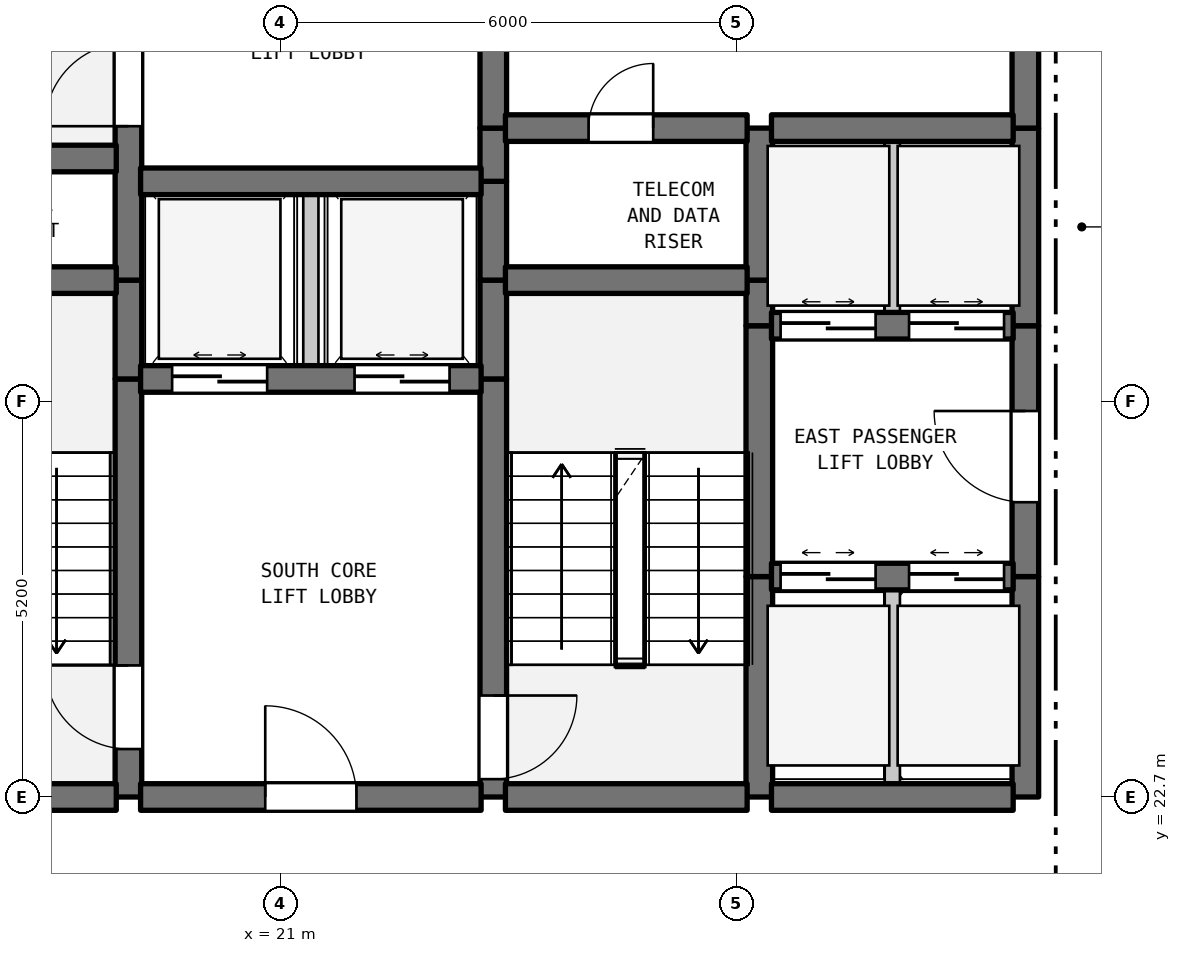
"""IFC4 building model, lengths in metres.
Left out: names, types, materials, properties, quantities, classifications, styles, units other than length and angle.
Written with IfcOpenShell. Run it as: python <this file> out.ifc"""

import sys

from ifc_helpers import new_model, si_unit, direction, frame, frame_2d, origin, place, context, subcontext, project, spatial, rectangle, extrude, element, fill, save


model = new_model("IFC4")
c1 = context("Model", 3, precision=1e-05, world=origin(), true_north=direction((0.0, 1.0)))
c2 = subcontext(c1, "Body", "Model", "MODEL_VIEW")
j1 = project(units=[si_unit("LENGTHUNIT", "METRE"), si_unit("PLANEANGLEUNIT", "RADIAN")], contexts=[c1])
p1 = place(None, origin())
s1 = spatial("IfcSite", under=j1, at=p1, CompositionType="ELEMENT")
p2 = place(p1, origin())
s2 = spatial("IfcBuilding", under=s1, at=p2, CompositionType="ELEMENT")
p3 = place(p2, frame((0.0, 0.0, 13.0)))
s3 = spatial("IfcBuildingStorey", under=s2, at=p3, CompositionType="ELEMENT", Elevation=13.0)
p4 = place(p3, frame((19.0, 22.7, 0.0), z_axis=(0.0, 0.0, 1.0), x_axis=(0.0, 1.0, 0.0)))
e1 = element("IfcWall", 1, at=p4, inside=s3, PredefinedType="SHEAR", context=c2, shape_type="SweptSolid", body=[
    extrude(rectangle(XDim=5.5, YDim=0.35, at=frame_2d((2.75, 0.0))), origin(), (0.0, 0.0, 1.0), 5.58),
])
p5 = place(p4, frame((0.631, 0.0, 0.0)))
e2 = element("IfcOpeningElement", 2, at=p5, cuts=e1, PredefinedType="OPENING", context=c2, shape_type="SweptSolid", body=[
    extrude(rectangle(XDim=1.1, YDim=2.15, at=frame_2d((0.55, 1.075))), frame((0.0, 0.185, 0.0), z_axis=(0.0, -1.0, 0.0), x_axis=(1.0, 0.0, 0.0)), (0.0, 0.0, 1.0), 0.37),
])
p6 = place(p3, frame((19.0, 28.2, 0.0), z_axis=(0.0, 0.0, 1.0), x_axis=(0.0, 1.0, 0.0)))
e3 = element("IfcWall", 3, at=p6, inside=s3, PredefinedType="SHEAR", context=c2, shape_type="SweptSolid", body=[
    extrude(rectangle(XDim=1.3, YDim=0.35, at=frame_2d((0.65, 0.0))), origin(), (0.0, 0.0, 1.0), 5.58),
])
p7 = place(p3, frame((19.0, 29.5, 0.0), z_axis=(0.0, 0.0, 1.0), x_axis=(0.0, 1.0, 0.0)))
e4 = element("IfcWall", 4, at=p7, inside=s3, PredefinedType="SHEAR", context=c2, shape_type="SweptSolid", body=[
    extrude(rectangle(XDim=5.5, YDim=0.35, at=frame_2d((2.75, 0.0))), origin(), (0.0, 0.0, 1.0), 5.58),
])
p8 = place(p7, frame((2.025, 0.0, 0.0)))
e5 = element("IfcOpeningElement", 5, at=p8, cuts=e4, PredefinedType="OPENING", context=c2, shape_type="SweptSolid", body=[
    extrude(rectangle(XDim=1.1, YDim=2.15, at=frame_2d((0.55, 1.075))), frame((0.0, 0.185, 0.0), z_axis=(0.0, -1.0, 0.0), x_axis=(1.0, 0.0, 0.0)), (0.0, 0.0, 1.0), 0.37),
])
p9 = place(p3, frame((21.4, 28.2, 0.0), z_axis=(0.0, 0.0, 1.0), x_axis=(0.0, 1.0, 0.0)))
e6 = element("IfcWall", 6, at=p9, inside=s3, PredefinedType="STANDARD", context=c2, shape_type="SweptSolid", body=[
    extrude(rectangle(XDim=2.6, YDim=0.2, at=frame_2d((1.3, 0.0))), origin(), (0.0, 0.0, 1.0), 5.58),
])
p10 = place(p3, frame((23.8, 22.7, 0.0), z_axis=(0.0, 0.0, 1.0), x_axis=(0.0, 1.0, 0.0)))
e7 = element("IfcWall", 7, at=p10, inside=s3, PredefinedType="SHEAR", context=c2, shape_type="SweptSolid", body=[
    extrude(rectangle(XDim=5.5, YDim=0.35, at=frame_2d((2.75, 0.0))), origin(), (0.0, 0.0, 1.0), 5.58),
])
p11 = place(p10, frame((0.235, 0.0, 0.0)))
e8 = element("IfcOpeningElement", 8, at=p11, cuts=e7, PredefinedType="OPENING", context=c2, shape_type="SweptSolid", body=[
    extrude(rectangle(XDim=1.1, YDim=2.15, at=frame_2d((0.55, 1.075))), frame((0.0, 0.185, 0.0), z_axis=(0.0, -1.0, 0.0), x_axis=(1.0, 0.0, 0.0)), (0.0, 0.0, 1.0), 0.37),
])
for number, where, z_axis, x_axis in (
    (9, (23.8, 28.2, 0.0), (0.0, 0.0, 1.0), (0.0, 1.0, 0.0)),
    (10, (23.8, 29.5, 0.0), (0.0, 0.0, 1.0), (0.0, 1.0, 0.0)),
):
    element("IfcWall", number, at=place(p3, frame(where, z_axis=z_axis, x_axis=x_axis)), inside=s3, PredefinedType="SHEAR", context=c2, shape_type="SweptSolid", body=[
        extrude(rectangle(XDim=1.3, YDim=0.35, at=frame_2d((0.65, 0.0))), origin(), (0.0, 0.0, 1.0), 5.58),
    ])
p12 = place(p3, frame((23.8, 30.8, 0.0), z_axis=(0.0, 0.0, 1.0), x_axis=(0.0, 1.0, 0.0)))
e11 = element("IfcWall", 11, at=p12, inside=s3, PredefinedType="SHEAR", context=c2, shape_type="SweptSolid", body=[
    extrude(rectangle(XDim=0.7, YDim=0.35, at=frame_2d((0.35, 0.0))), origin(), (0.0, 0.0, 1.0), 5.58),
])
p13 = place(p3, frame((23.8, 31.5, 0.0), z_axis=(0.0, 0.0, 1.0), x_axis=(0.0, 1.0, 0.0)))
e12 = element("IfcWall", 12, at=p13, inside=s3, PredefinedType="SHEAR", context=c2, shape_type="SweptSolid", body=[
    extrude(rectangle(XDim=3.5, YDim=0.35, at=frame_2d((1.75, 0.0))), origin(), (0.0, 0.0, 1.0), 5.58),
])
p14 = place(p13, frame((1.127, 0.0, 0.0)))
e13 = element("IfcOpeningElement", 13, at=p14, cuts=e12, PredefinedType="OPENING", context=c2, shape_type="SweptSolid", body=[
    extrude(rectangle(XDim=1.1, YDim=2.15, at=frame_2d((0.55, 1.075))), frame((0.0, 0.185, 0.0), z_axis=(0.0, -1.0, 0.0), x_axis=(1.0, 0.0, 0.0)), (0.0, 0.0, 1.0), 0.37),
])
p15 = place(p3, frame((27.3, 22.7, 0.0), z_axis=(0.0, 0.0, 1.0), x_axis=(0.0, 1.0, 0.0)))
e14 = element("IfcWall", 14, at=p15, inside=s3, PredefinedType="SHEAR", context=c2, shape_type="SweptSolid", body=[
    extrude(rectangle(XDim=2.9, YDim=0.35, at=frame_2d((1.45, 0.0))), origin(), (0.0, 0.0, 1.0), 5.58),
])
p16 = place(p3, frame((27.3, 25.6, 0.0), z_axis=(0.0, 0.0, 1.0), x_axis=(0.0, 1.0, 0.0)))
e15 = element("IfcWall", 15, at=p16, inside=s3, PredefinedType="SHEAR", context=c2, shape_type="SweptSolid", body=[
    extrude(rectangle(XDim=3.3, YDim=0.35, at=frame_2d((1.65, 0.0))), origin(), (0.0, 0.0, 1.0), 5.58),
])
p17 = place(p3, frame((27.3, 28.9, 0.0), z_axis=(0.0, 0.0, 1.0), x_axis=(0.0, 1.0, 0.0)))
e16 = element("IfcWall", 16, at=p17, inside=s3, PredefinedType="SHEAR", context=c2, shape_type="SweptSolid", body=[
    extrude(rectangle(XDim=0.6, YDim=0.35, at=frame_2d((0.3, 0.0))), origin(), (0.0, 0.0, 1.0), 5.58),
])
p18 = place(p3, frame((27.3, 29.5, 0.0), z_axis=(0.0, 0.0, 1.0), x_axis=(0.0, 1.0, 0.0)))
e17 = element("IfcWall", 17, at=p18, inside=s3, PredefinedType="SHEAR", context=c2, shape_type="SweptSolid", body=[
    extrude(rectangle(XDim=2.0, YDim=0.35, at=frame_2d((1.0, 0.0))), origin(), (0.0, 0.0, 1.0), 5.58),
])
p19 = place(p3, frame((29.05, 22.7, 0.0), z_axis=(0.0, 0.0, 1.0), x_axis=(0.0, 1.0, 0.0)))
e18 = element("IfcWall", 18, at=p19, inside=s3, PredefinedType="STANDARD", context=c2, shape_type="SweptSolid", body=[
    extrude(rectangle(XDim=2.9, YDim=0.2, at=frame_2d((1.45, 0.0))), origin(), (0.0, 0.0, 1.0), 5.58),
])
p20 = place(p3, frame((29.05, 28.9, 0.0), z_axis=(0.0, 0.0, 1.0), x_axis=(0.0, 1.0, 0.0)))
e19 = element("IfcWall", 19, at=p20, inside=s3, PredefinedType="STANDARD", context=c2, shape_type="SweptSolid", body=[
    extrude(rectangle(XDim=2.6, YDim=0.2, at=frame_2d((1.3, 0.0))), origin(), (0.0, 0.0, 1.0), 5.58),
])
p21 = place(p3, frame((30.8, 22.7, 0.0), z_axis=(0.0, 0.0, 1.0), x_axis=(0.0, 1.0, 0.0)))
e20 = element("IfcWall", 20, at=p21, inside=s3, PredefinedType="SHEAR", context=c2, shape_type="SweptSolid", body=[
    extrude(rectangle(XDim=2.9, YDim=0.35, at=frame_2d((1.45, 0.0))), origin(), (0.0, 0.0, 1.0), 5.58),
])
p22 = place(p3, frame((30.8, 25.6, 0.0), z_axis=(0.0, 0.0, 1.0), x_axis=(0.0, 1.0, 0.0)))
e21 = element("IfcWall", 21, at=p22, inside=s3, PredefinedType="SHEAR", context=c2, shape_type="SweptSolid", body=[
    extrude(rectangle(XDim=3.3, YDim=0.35, at=frame_2d((1.65, 0.0))), origin(), (0.0, 0.0, 1.0), 5.58),
])
p23 = place(p22, frame((0.978, 0.0, 0.0)))
e22 = element("IfcOpeningElement", 22, at=p23, cuts=e21, PredefinedType="OPENING", context=c2, shape_type="SweptSolid", body=[
    extrude(rectangle(XDim=1.2, YDim=2.2, at=frame_2d((0.6, 1.1))), frame((0.0, 0.185, 0.0), z_axis=(0.0, -1.0, 0.0), x_axis=(1.0, 0.0, 0.0)), (0.0, 0.0, 1.0), 0.37),
])
p24 = place(p3, frame((30.8, 28.9, 0.0), z_axis=(0.0, 0.0, 1.0), x_axis=(0.0, 1.0, 0.0)))
e23 = element("IfcWall", 23, at=p24, inside=s3, PredefinedType="SHEAR", context=c2, shape_type="SweptSolid", body=[
    extrude(rectangle(XDim=2.6, YDim=0.35, at=frame_2d((1.3, 0.0))), origin(), (0.0, 0.0, 1.0), 5.58),
])
p25 = place(p3, frame((30.8, 31.5, 0.0), z_axis=(0.0, 0.0, 1.0), x_axis=(0.0, 1.0, 0.0)))
e24 = element("IfcWall", 24, at=p25, inside=s3, PredefinedType="SHEAR", context=c2, shape_type="SweptSolid", body=[
    extrude(rectangle(XDim=3.5, YDim=0.35, at=frame_2d((1.75, 0.0))), origin(), (0.0, 0.0, 1.0), 5.58),
])
p26 = place(p25, frame((1.15, 0.0, 0.0)))
e25 = element("IfcOpeningElement", 25, at=p26, cuts=e24, PredefinedType="OPENING", context=c2, shape_type="SweptSolid", body=[
    extrude(rectangle(XDim=1.2, YDim=2.2, at=frame_2d((0.6, 1.1))), frame((0.0, 0.185, 0.0), z_axis=(0.0, -1.0, 0.0), x_axis=(1.0, 0.0, 0.0)), (0.0, 0.0, 1.0), 0.37),
])
p27 = place(p3, frame((15.16, 22.7, 0.0), z_axis=(0.0, 0.0, 1.0), x_axis=(1.0, 0.0, 0.0)))
e26 = element("IfcWall", 26, at=p27, inside=s3, PredefinedType="SHEAR", context=c2, shape_type="SweptSolid", body=[
    extrude(rectangle(XDim=3.68, YDim=0.35, at=frame_2d((1.84, 0.0))), origin(), (0.0, 0.0, 1.0), 5.58),
])
p28 = place(p3, frame((19.16, 22.7, 0.0), z_axis=(0.0, 0.0, 1.0), x_axis=(1.0, 0.0, 0.0)))
e27 = element("IfcWall", 27, at=p28, inside=s3, PredefinedType="SHEAR", context=c2, shape_type="SweptSolid", body=[
    extrude(rectangle(XDim=4.48, YDim=0.35, at=frame_2d((2.24, 0.0))), origin(), (0.0, 0.0, 1.0), 5.58),
])
p29 = place(p28, frame((1.64, 0.0, 0.0)))
e28 = element("IfcOpeningElement", 28, at=p29, cuts=e27, PredefinedType="OPENING", context=c2, shape_type="SweptSolid", body=[
    extrude(rectangle(XDim=1.2, YDim=2.2, at=frame_2d((0.6, 1.1))), frame((0.0, 0.185, 0.0), z_axis=(0.0, -1.0, 0.0), x_axis=(1.0, 0.0, 0.0)), (0.0, 0.0, 1.0), 0.37),
])
for number, where, z_axis, x_axis in (
    (29, (23.96, 22.7, 0.0), (0.0, 0.0, 1.0), (1.0, 0.0, 0.0)),
    (30, (27.46, 22.7, 0.0), (0.0, 0.0, 1.0), (1.0, 0.0, 0.0)),
):
    element("IfcWall", number, at=place(p3, frame(where, z_axis=z_axis, x_axis=x_axis)), inside=s3, PredefinedType="SHEAR", context=c2, shape_type="SweptSolid", body=[
        extrude(rectangle(XDim=3.18, YDim=0.35, at=frame_2d((1.59, 0.0))), origin(), (0.0, 0.0, 1.0), 5.58),
    ])
p30 = place(p3, frame((27.46, 25.6, 0.0), z_axis=(0.0, 0.0, 1.0), x_axis=(1.0, 0.0, 0.0)))
e31 = element("IfcWall", 31, at=p30, inside=s3, PredefinedType="SHEAR", context=c2, shape_type="SweptSolid", body=[
    extrude(rectangle(XDim=3.18, YDim=0.35, at=frame_2d((1.59, 0.0))), origin(), (0.0, 0.0, 1.0), 5.58),
])
p31 = place(p30, frame((0.12, 0.0, 0.0)))
e32 = element("IfcOpeningElement", 32, at=p31, cuts=e31, PredefinedType="OPENING", context=c2, shape_type="SweptSolid", body=[
    extrude(rectangle(XDim=1.25, YDim=2.2, at=frame_2d((0.625, 1.1))), frame((0.0, 0.185, 0.0), z_axis=(0.0, -1.0, 0.0), x_axis=(1.0, 0.0, 0.0)), (0.0, 0.0, 1.0), 0.37),
])
p32 = place(p30, frame((1.81, 0.0, 0.0)))
e33 = element("IfcOpeningElement", 33, at=p32, cuts=e31, PredefinedType="OPENING", context=c2, shape_type="SweptSolid", body=[
    extrude(rectangle(XDim=1.25, YDim=2.2, at=frame_2d((0.625, 1.1))), frame((0.0, 0.185, 0.0), z_axis=(0.0, -1.0, 0.0), x_axis=(1.0, 0.0, 0.0)), (0.0, 0.0, 1.0), 0.37),
])
p33 = place(p3, frame((19.16, 28.2, 0.0), z_axis=(0.0, 0.0, 1.0), x_axis=(1.0, 0.0, 0.0)))
e34 = element("IfcWall", 34, at=p33, inside=s3, PredefinedType="SHEAR", context=c2, shape_type="SweptSolid", body=[
    extrude(rectangle(XDim=4.48, YDim=0.35, at=frame_2d((2.24, 0.0))), origin(), (0.0, 0.0, 1.0), 5.58),
])
p34 = place(p33, frame((0.415, 0.0, 0.0)))
e35 = element("IfcOpeningElement", 35, at=p34, cuts=e34, PredefinedType="OPENING", context=c2, shape_type="SweptSolid", body=[
    extrude(rectangle(XDim=1.25, YDim=2.2, at=frame_2d((0.625, 1.1))), frame((0.0, 0.185, 0.0), z_axis=(0.0, -1.0, 0.0), x_axis=(1.0, 0.0, 0.0)), (0.0, 0.0, 1.0), 0.37),
])
p35 = place(p33, frame((2.815, 0.0, 0.0)))
e36 = element("IfcOpeningElement", 36, at=p35, cuts=e34, PredefinedType="OPENING", context=c2, shape_type="SweptSolid", body=[
    extrude(rectangle(XDim=1.25, YDim=2.2, at=frame_2d((0.625, 1.1))), frame((0.0, 0.185, 0.0), z_axis=(0.0, -1.0, 0.0), x_axis=(1.0, 0.0, 0.0)), (0.0, 0.0, 1.0), 0.37),
])
p36 = place(p3, frame((27.46, 28.9, 0.0), z_axis=(0.0, 0.0, 1.0), x_axis=(1.0, 0.0, 0.0)))
e37 = element("IfcWall", 37, at=p36, inside=s3, PredefinedType="SHEAR", context=c2, shape_type="SweptSolid", body=[
    extrude(rectangle(XDim=3.18, YDim=0.35, at=frame_2d((1.59, 0.0))), origin(), (0.0, 0.0, 1.0), 5.58),
])
p37 = place(p36, frame((0.12, 0.0, 0.0)))
e38 = element("IfcOpeningElement", 38, at=p37, cuts=e37, PredefinedType="OPENING", context=c2, shape_type="SweptSolid", body=[
    extrude(rectangle(XDim=1.25, YDim=2.2, at=frame_2d((0.625, 1.1))), frame((0.0, 0.185, 0.0), z_axis=(0.0, -1.0, 0.0), x_axis=(1.0, 0.0, 0.0)), (0.0, 0.0, 1.0), 0.37),
])
p38 = place(p36, frame((1.81, 0.0, 0.0)))
e39 = element("IfcOpeningElement", 39, at=p38, cuts=e37, PredefinedType="OPENING", context=c2, shape_type="SweptSolid", body=[
    extrude(rectangle(XDim=1.25, YDim=2.2, at=frame_2d((0.625, 1.1))), frame((0.0, 0.185, 0.0), z_axis=(0.0, -1.0, 0.0), x_axis=(1.0, 0.0, 0.0)), (0.0, 0.0, 1.0), 0.37),
])
p39 = place(p3, frame((15.16, 29.5, 0.0), z_axis=(0.0, 0.0, 1.0), x_axis=(1.0, 0.0, 0.0)))
e40 = element("IfcWall", 40, at=p39, inside=s3, PredefinedType="SHEAR", context=c2, shape_type="SweptSolid", body=[
    extrude(rectangle(XDim=3.68, YDim=0.35, at=frame_2d((1.84, 0.0))), origin(), (0.0, 0.0, 1.0), 5.58),
])
p40 = place(p3, frame((23.96, 29.5, 0.0), z_axis=(0.0, 0.0, 1.0), x_axis=(1.0, 0.0, 0.0)))
e41 = element("IfcWall", 41, at=p40, inside=s3, PredefinedType="SHEAR", context=c2, shape_type="SweptSolid", body=[
    extrude(rectangle(XDim=3.18, YDim=0.35, at=frame_2d((1.59, 0.0))), origin(), (0.0, 0.0, 1.0), 5.58),
])
p41 = place(p3, frame((19.16, 30.8, 0.0), z_axis=(0.0, 0.0, 1.0), x_axis=(1.0, 0.0, 0.0)))
e42 = element("IfcWall", 42, at=p41, inside=s3, PredefinedType="SHEAR", context=c2, shape_type="SweptSolid", body=[
    extrude(rectangle(XDim=4.48, YDim=0.35, at=frame_2d((2.24, 0.0))), origin(), (0.0, 0.0, 1.0), 5.58),
])
p42 = place(p3, frame((15.16, 31.1, 0.0), z_axis=(0.0, 0.0, 1.0), x_axis=(1.0, 0.0, 0.0)))
e43 = element("IfcWall", 43, at=p42, inside=s3, PredefinedType="SHEAR", context=c2, shape_type="SweptSolid", body=[
    extrude(rectangle(XDim=3.68, YDim=0.35, at=frame_2d((1.84, 0.0))), origin(), (0.0, 0.0, 1.0), 5.58),
])
p43 = place(p3, frame((23.96, 31.5, 0.0), z_axis=(0.0, 0.0, 1.0), x_axis=(1.0, 0.0, 0.0)))
e44 = element("IfcWall", 44, at=p43, inside=s3, PredefinedType="SHEAR", context=c2, shape_type="SweptSolid", body=[
    extrude(rectangle(XDim=3.18, YDim=0.35, at=frame_2d((1.59, 0.0))), origin(), (0.0, 0.0, 1.0), 5.58),
])
p44 = place(p43, frame((1.094, 0.0, 0.0)))
e45 = element("IfcOpeningElement", 45, at=p44, cuts=e44, PredefinedType="OPENING", context=c2, shape_type="SweptSolid", body=[
    extrude(rectangle(XDim=0.85, YDim=2.1, at=frame_2d((0.425, 1.05))), frame((0.0, 0.185, 0.0), z_axis=(0.0, -1.0, 0.0), x_axis=(1.0, 0.0, 0.0)), (0.0, 0.0, 1.0), 0.37),
])
p45 = place(p3, frame((27.46, 31.5, 0.0), z_axis=(0.0, 0.0, 1.0), x_axis=(1.0, 0.0, 0.0)))
e46 = element("IfcWall", 46, at=p45, inside=s3, PredefinedType="SHEAR", context=c2, shape_type="SweptSolid", body=[
    extrude(rectangle(XDim=3.18, YDim=0.35, at=frame_2d((1.59, 0.0))), origin(), (0.0, 0.0, 1.0), 5.58),
])
p46 = place(p5, origin())
e47 = element("IfcDoor", 47, at=p46, inside=s3, OperationType="SINGLE_SWING_RIGHT", PredefinedType="DOOR", context=c2, shape_type="SweptSolid", body=[
    extrude(rectangle(XDim=1.1, YDim=2.15, at=frame_2d((0.55, 1.075))), frame((0.0, 0.025, 0.0), z_axis=(0.0, -1.0, 0.0), x_axis=(1.0, 0.0, 0.0)), (0.0, 0.0, 1.0), 0.05),
])
fill(e2, e47)
p47 = place(p8, origin())
e48 = element("IfcDoor", 48, at=p47, inside=s3, OperationType="SINGLE_SWING_LEFT", PredefinedType="DOOR", context=c2, shape_type="SweptSolid", body=[
    extrude(rectangle(XDim=1.1, YDim=2.15, at=frame_2d((0.55, 1.075))), frame((0.0, 0.025, 0.0), z_axis=(0.0, -1.0, 0.0), x_axis=(1.0, 0.0, 0.0)), (0.0, 0.0, 1.0), 0.05),
])
fill(e5, e48)
p48 = place(p11, frame((1.1, 0.0, 0.0), z_axis=(0.0, 0.0, 1.0), x_axis=(-1.0, 0.0, 0.0)))
e49 = element("IfcDoor", 49, at=p48, inside=s3, OperationType="SINGLE_SWING_RIGHT", PredefinedType="DOOR", context=c2, shape_type="SweptSolid", body=[
    extrude(rectangle(XDim=1.1, YDim=2.15, at=frame_2d((0.55, 1.075))), frame((0.0, 0.025, 0.0), z_axis=(0.0, -1.0, 0.0), x_axis=(1.0, 0.0, 0.0)), (0.0, 0.0, 1.0), 0.05),
])
fill(e8, e49)
p49 = place(p23, origin())
e50 = element("IfcDoor", 50, at=p49, inside=s3, OperationType="SINGLE_SWING_RIGHT", PredefinedType="DOOR", context=c2, shape_type="SweptSolid", body=[
    extrude(rectangle(XDim=1.2, YDim=2.2, at=frame_2d((0.6, 1.1))), frame((0.0, 0.025, 0.0), z_axis=(0.0, -1.0, 0.0), x_axis=(1.0, 0.0, 0.0)), (0.0, 0.0, 1.0), 0.05),
])
fill(e22, e50)
p50 = place(p29, origin())
e51 = element("IfcDoor", 51, at=p50, inside=s3, OperationType="SINGLE_SWING_LEFT", PredefinedType="DOOR", context=c2, shape_type="SweptSolid", body=[
    extrude(rectangle(XDim=1.2, YDim=2.2, at=frame_2d((0.6, 1.1))), frame((0.0, 0.025, 0.0), z_axis=(0.0, -1.0, 0.0), x_axis=(1.0, 0.0, 0.0)), (0.0, 0.0, 1.0), 0.05),
])
fill(e28, e51)
p51 = place(p31, origin())
e52 = element("IfcDoor", 52, at=p51, inside=s3, OperationType="DOUBLE_DOOR_SLIDING", PredefinedType="DOOR", context=c2, shape_type="SweptSolid", body=[
    extrude(rectangle(XDim=1.25, YDim=2.2, at=frame_2d((0.625, 1.1))), frame((0.0, 0.025, 0.0), z_axis=(0.0, -1.0, 0.0), x_axis=(1.0, 0.0, 0.0)), (0.0, 0.0, 1.0), 0.05),
])
fill(e32, e52)
p52 = place(p32, origin())
e53 = element("IfcDoor", 53, at=p52, inside=s3, OperationType="DOUBLE_DOOR_SLIDING", PredefinedType="DOOR", context=c2, shape_type="SweptSolid", body=[
    extrude(rectangle(XDim=1.25, YDim=2.2, at=frame_2d((0.625, 1.1))), frame((0.0, 0.025, 0.0), z_axis=(0.0, -1.0, 0.0), x_axis=(1.0, 0.0, 0.0)), (0.0, 0.0, 1.0), 0.05),
])
fill(e33, e53)
p53 = place(p34, origin())
e54 = element("IfcDoor", 54, at=p53, inside=s3, OperationType="DOUBLE_DOOR_SLIDING", PredefinedType="DOOR", context=c2, shape_type="SweptSolid", body=[
    extrude(rectangle(XDim=1.25, YDim=2.2, at=frame_2d((0.625, 1.1))), frame((0.0, 0.025, 0.0), z_axis=(0.0, -1.0, 0.0), x_axis=(1.0, 0.0, 0.0)), (0.0, 0.0, 1.0), 0.05),
])
fill(e35, e54)
p54 = place(p35, origin())
e55 = element("IfcDoor", 55, at=p54, inside=s3, OperationType="DOUBLE_DOOR_SLIDING", PredefinedType="DOOR", context=c2, shape_type="SweptSolid", body=[
    extrude(rectangle(XDim=1.25, YDim=2.2, at=frame_2d((0.625, 1.1))), frame((0.0, 0.025, 0.0), z_axis=(0.0, -1.0, 0.0), x_axis=(1.0, 0.0, 0.0)), (0.0, 0.0, 1.0), 0.05),
])
fill(e36, e55)
p55 = place(p37, origin())
e56 = element("IfcDoor", 56, at=p55, inside=s3, OperationType="DOUBLE_DOOR_SLIDING", PredefinedType="DOOR", context=c2, shape_type="SweptSolid", body=[
    extrude(rectangle(XDim=1.25, YDim=2.2, at=frame_2d((0.625, 1.1))), frame((0.0, 0.025, 0.0), z_axis=(0.0, -1.0, 0.0), x_axis=(1.0, 0.0, 0.0)), (0.0, 0.0, 1.0), 0.05),
])
fill(e38, e56)
p56 = place(p38, origin())
e57 = element("IfcDoor", 57, at=p56, inside=s3, OperationType="DOUBLE_DOOR_SLIDING", PredefinedType="DOOR", context=c2, shape_type="SweptSolid", body=[
    extrude(rectangle(XDim=1.25, YDim=2.2, at=frame_2d((0.625, 1.1))), frame((0.0, 0.025, 0.0), z_axis=(0.0, -1.0, 0.0), x_axis=(1.0, 0.0, 0.0)), (0.0, 0.0, 1.0), 0.05),
])
fill(e39, e57)
p57 = place(p44, origin())
e58 = element("IfcDoor", 58, at=p57, inside=s3, OperationType="SINGLE_SWING_RIGHT", PredefinedType="DOOR", context=c2, shape_type="SweptSolid", body=[
    extrude(rectangle(XDim=0.85, YDim=2.1, at=frame_2d((0.425, 1.05))), frame((0.0, 0.025, 0.0), z_axis=(0.0, -1.0, 0.0), x_axis=(1.0, 0.0, 0.0)), (0.0, 0.0, 1.0), 0.05),
])
fill(e45, e58)
save(model, sys.argv[1])
